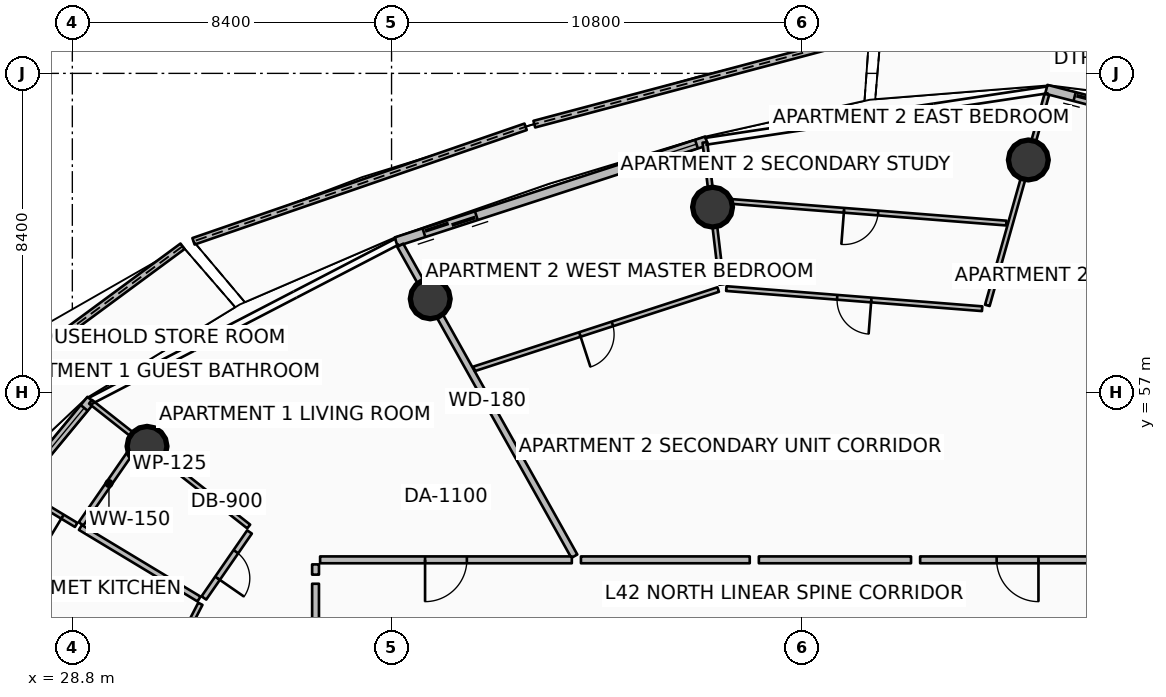
"""IFC4 building model, lengths in metres.
Left out: names, types, materials, properties, quantities, classifications, styles, units other than length and angle.
Written with IfcOpenShell. Run it as: python <this file> out.ifc"""

import sys

from ifc_helpers import new_model, si_unit, direction, frame, frame_2d, origin, origin_2d, place, context, subcontext, project, spatial, polyline, rectangle, circle, outline, extrude, element, fill, save


model = new_model("IFC4")
c1 = context("Model", 3, precision=1e-05, world=origin(), true_north=direction((0.0, 1.0)))
c2 = subcontext(c1, "Body", "Model", "MODEL_VIEW")
j1 = project(units=[si_unit("LENGTHUNIT", "METRE"), si_unit("PLANEANGLEUNIT", "RADIAN")], contexts=[c1])
p1 = place(None, origin())
s1 = spatial("IfcSite", under=j1, at=p1, CompositionType="ELEMENT")
p2 = place(p1, origin())
s2 = spatial("IfcBuilding", under=s1, at=p2, CompositionType="ELEMENT")
p3 = place(p2, frame((0.0, 0.0, 169.05)))
s3 = spatial("IfcBuildingStorey", under=s2, at=p3, CompositionType="ELEMENT", Elevation=169.05)
for number, where, z_axis, x_axis in (
    (1, (53.957, 63.122, 0.0), (0.0, 0.0, 1.0), (1.0, 0.0, 0.0)),
    (2, (45.647, 61.881, 0.0), (0.0, 0.0, 1.0), (1.0, 0.0, 0.0)),
    (3, (38.218, 59.467, 0.0), (0.0, 0.0, 1.0), (1.0, 0.0, 0.0)),
    (4, (30.766, 55.586, 0.0), (0.0, 0.0, 1.0), (1.0, 0.0, 0.0)),
):
    element("IfcColumn", number, at=place(p3, frame(where, z_axis=z_axis, x_axis=x_axis)), inside=s3, PredefinedType="COLUMN", context=c2, shape_type="SweptSolid", body=[
        extrude(circle(Radius=0.525, at=origin_2d()), origin(), (0.0, 0.0, 1.0), 3.5),
    ])
p4 = place(p3, frame((49.771, 66.404, 0.0), z_axis=(0.0, 0.0, 1.0), x_axis=(-0.966520511407, -0.256589362658, 0.0)))
e5 = element("IfcWall", 5, at=p4, inside=s3, PredefinedType="PARAPET", context=c2, shape_type="SweptSolid", body=[
    extrude(outline(polyline([(0.0, 0.0), (9.119, 0.0), (9.119, 1.148), (4.56, 1.127), (0.0, 1.224), (0.0, 0.0)])), frame((0.0, 0.09, 0.0), z_axis=(0.0, -1.0, 0.0), x_axis=(1.0, 0.0, 0.0)), (0.0, 0.0, 1.0), 0.18),
])
p5 = place(p3, frame((40.728, 63.994, 0.0), z_axis=(0.0, 0.0, 1.0), x_axis=(-0.945395712623, -0.325924755971, 0.0)))
e6 = element("IfcWall", 6, at=p5, inside=s3, PredefinedType="PARAPET", context=c2, shape_type="SweptSolid", body=[
    extrude(outline(polyline([(0.0, 0.0), (9.244, 0.0), (9.244, 1.483), (4.622, 1.284), (0.0, 1.148), (0.0, 0.0)])), frame((0.0, 0.09, 0.0), z_axis=(0.0, -1.0, 0.0), x_axis=(1.0, 0.0, 0.0)), (0.0, 0.0, 1.0), 0.18),
])
p6 = place(p3, frame((31.7, 60.85, 0.0), z_axis=(0.0, 0.0, 1.0), x_axis=(-0.804716582715, -0.593659179584, 0.0)))
e7 = element("IfcWall", 7, at=p6, inside=s3, PredefinedType="PARAPET", context=c2, shape_type="SweptSolid", body=[
    extrude(outline(polyline([(0.0, 0.0), (10.386, 0.0), (10.386, 1.832), (5.193, 1.696), (0.0, 1.497), (0.0, 0.0)])), frame((0.0, 0.09, 0.0), z_axis=(0.0, -1.0, 0.0), x_axis=(1.0, 0.0, 0.0)), (0.0, 0.0, 1.0), 0.18),
])
p7 = place(p3, frame((64.192, 62.466, 0.0), z_axis=(0.0, 0.0, 1.0), x_axis=(-0.968379685126, 0.249481032214, 0.0)))
e8 = element("IfcWall", 8, at=p7, inside=s3, PredefinedType="SOLIDWALL", context=c2, shape_type="SweptSolid", body=[
    extrude(rectangle(XDim=10.082, YDim=0.24, at=frame_2d((5.041, 0.0))), origin(), (0.0, 0.0, 1.0), 2.45),
])
p8 = place(p7, frame((7.862, 0.0, 0.0)))
e9 = element("IfcOpeningElement", 9, at=p8, cuts=e8, PredefinedType="OPENING", context=c2, shape_type="SweptSolid", body=[
    extrude(rectangle(XDim=1.45, YDim=2.15, at=frame_2d((0.725, 1.075))), frame((0.0, 0.13, 0.0), z_axis=(0.0, -1.0, 0.0), x_axis=(1.0, 0.0, 0.0)), (0.0, 0.0, 1.0), 0.26),
])
p9 = place(p7, frame((0.28, 0.0, 0.65)))
e10 = element("IfcOpeningElement", 10, at=p9, cuts=e8, PredefinedType="OPENING", context=c2, shape_type="SweptSolid", body=[
    extrude(rectangle(XDim=1.6, YDim=1.5, at=frame_2d((0.8, 0.75))), frame((0.0, 0.13, 0.0), z_axis=(0.0, -1.0, 0.0), x_axis=(1.0, 0.0, 0.0)), (0.0, 0.0, 1.0), 0.26),
])
p10 = place(p3, frame((45.49, 63.624, 0.0), z_axis=(0.0, 0.0, 1.0), x_axis=(-0.951046390632, -0.309048156224, 0.0)))
e11 = element("IfcWall", 11, at=p10, inside=s3, PredefinedType="SOLIDWALL", context=c2, shape_type="SweptSolid", body=[
    extrude(rectangle(XDim=8.59, YDim=0.24, at=frame_2d((4.295, 0.0))), origin(), (0.0, 0.0, 1.0), 2.45),
])
p11 = place(p10, frame((6.37, 0.0, 0.0)))
e12 = element("IfcOpeningElement", 12, at=p11, cuts=e11, PredefinedType="OPENING", context=c2, shape_type="SweptSolid", body=[
    extrude(rectangle(XDim=1.45, YDim=2.15, at=frame_2d((0.725, 1.075))), frame((0.0, 0.13, 0.0), z_axis=(0.0, -1.0, 0.0), x_axis=(1.0, 0.0, 0.0)), (0.0, 0.0, 1.0), 0.26),
])
p12 = place(p10, frame((0.28, 0.0, 0.65)))
e13 = element("IfcOpeningElement", 13, at=p12, cuts=e11, PredefinedType="OPENING", context=c2, shape_type="SweptSolid", body=[
    extrude(rectangle(XDim=1.6, YDim=1.5, at=frame_2d((0.8, 0.75))), frame((0.0, 0.13, 0.0), z_axis=(0.0, -1.0, 0.0), x_axis=(1.0, 0.0, 0.0)), (0.0, 0.0, 1.0), 0.26),
])
p13 = place(p3, frame((29.291, 56.813, 0.0), z_axis=(0.0, 0.0, 1.0), x_axis=(-0.636771922292, -0.77105221547, 0.0)))
e14 = element("IfcWall", 14, at=p13, inside=s3, PredefinedType="SOLIDWALL", context=c2, shape_type="SweptSolid", body=[
    extrude(rectangle(XDim=10.082, YDim=0.24, at=frame_2d((5.041, 0.0))), origin(), (0.0, 0.0, 1.0), 2.45),
])
p14 = place(p13, frame((7.862, 0.0, 0.0)))
e15 = element("IfcOpeningElement", 15, at=p14, cuts=e14, PredefinedType="OPENING", context=c2, shape_type="SweptSolid", body=[
    extrude(rectangle(XDim=1.45, YDim=2.15, at=frame_2d((0.725, 1.075))), frame((0.0, 0.13, 0.0), z_axis=(0.0, -1.0, 0.0), x_axis=(1.0, 0.0, 0.0)), (0.0, 0.0, 1.0), 0.26),
])
p15 = place(p13, frame((0.28, 0.0, 0.65)))
e16 = element("IfcOpeningElement", 16, at=p15, cuts=e14, PredefinedType="OPENING", context=c2, shape_type="SweptSolid", body=[
    extrude(rectangle(XDim=1.6, YDim=1.5, at=frame_2d((0.8, 0.75))), frame((0.0, 0.13, 0.0), z_axis=(0.0, -1.0, 0.0), x_axis=(1.0, 0.0, 0.0)), (0.0, 0.0, 1.0), 0.26),
])
p16 = place(p3, frame((42.01, 52.696, 0.0), z_axis=(0.0, 0.0, 1.0), x_axis=(-0.488627157427, 0.872492693967, 0.0)))
e17 = element("IfcWall", 17, at=p16, inside=s3, PredefinedType="PARTITIONING", context=c2, shape_type="SweptSolid", body=[
    extrude(rectangle(XDim=9.375, YDim=0.18, at=frame_2d((4.688, 0.0))), origin(), (0.0, 0.0, 1.0), 2.94),
])
p17 = place(p3, frame((41.944, 52.6, 0.0), z_axis=(0.0, 0.0, 1.0), x_axis=(-1.0, 0.0, 0.0)))
e18 = element("IfcWall", 18, at=p17, inside=s3, PredefinedType="PARTITIONING", context=c2, shape_type="SweptSolid", body=[
    extrude(rectangle(XDim=6.624, YDim=0.18, at=frame_2d((3.312, 0.0))), origin(), (0.0, 0.0, 1.0), 2.94),
])
p18 = place(p17, frame((2.762, 0.0, 0.0)))
e19 = element("IfcOpeningElement", 19, at=p18, cuts=e18, PredefinedType="OPENING", context=c2, shape_type="SweptSolid", body=[
    extrude(rectangle(XDim=1.1, YDim=2.1, at=frame_2d((0.55, 1.05))), frame((0.0, 0.1, 0.0), z_axis=(0.0, -1.0, 0.0), x_axis=(1.0, 0.0, 0.0)), (0.0, 0.0, 1.0), 0.2),
])
p19 = place(p3, frame((35.2, 52.48, 0.0), z_axis=(0.0, 0.0, 1.0), x_axis=(0.0, -1.0, 0.0)))
e20 = element("IfcWall", 20, at=p19, inside=s3, PredefinedType="PARTITIONING", context=c2, shape_type="SweptSolid", body=[
    extrude(rectangle(XDim=0.269, YDim=0.18, at=frame_2d((0.135, 0.0))), origin(), (0.0, 0.0, 1.0), 2.94),
])
p20 = place(p3, frame((35.2, 51.971, 0.0), z_axis=(0.0, 0.0, 1.0), x_axis=(0.0, -1.0, 0.0)))
e21 = element("IfcWall", 21, at=p20, inside=s3, PredefinedType="PARTITIONING", context=c2, shape_type="SweptSolid", body=[
    extrude(rectangle(XDim=6.241, YDim=0.18, at=frame_2d((3.12, 0.0))), origin(), (0.0, 0.0, 1.0), 2.94),
])
p21 = place(p3, frame((33.441, 53.477, 0.0), z_axis=(0.0, 0.0, 1.0), x_axis=(-0.785319981095, 0.619090080112, 0.0)))
e22 = element("IfcWall", 22, at=p21, inside=s3, PredefinedType="PARTITIONING", context=c2, shape_type="SweptSolid", body=[
    extrude(rectangle(XDim=5.301, YDim=0.125, at=frame_2d((2.65, 0.0))), origin(), (0.0, 0.0, 1.0), 2.94),
])
p22 = place(p3, frame((33.463, 53.333, 0.0), z_axis=(0.0, 0.0, 1.0), x_axis=(-0.568843105688, -0.822446059697, 0.0)))
e23 = element("IfcWall", 23, at=p22, inside=s3, PredefinedType="PARTITIONING", context=c2, shape_type="SweptSolid", body=[
    extrude(rectangle(XDim=2.111, YDim=0.15, at=frame_2d((1.056, 0.0))), origin(), (0.0, 0.0, 1.0), 2.94),
])
p23 = place(p22, frame((0.631, 0.0, 0.0)))
e24 = element("IfcOpeningElement", 24, at=p23, cuts=e23, PredefinedType="OPENING", context=c2, shape_type="SweptSolid", body=[
    extrude(rectangle(XDim=0.85, YDim=2.06, at=frame_2d((0.425, 1.03))), frame((0.0, 0.085, 0.0), z_axis=(0.0, -1.0, 0.0), x_axis=(1.0, 0.0, 0.0)), (0.0, 0.0, 1.0), 0.17),
])
p24 = place(p3, frame((30.498, 55.67, 0.0), z_axis=(0.0, 0.0, 1.0), x_axis=(-0.56886579211, -0.822430368218, 0.0)))
e25 = element("IfcWall", 25, at=p24, inside=s3, PredefinedType="PARTITIONING", context=c2, shape_type="SweptSolid", body=[
    extrude(rectangle(XDim=2.582, YDim=0.15, at=frame_2d((1.291, 0.0))), origin(), (0.0, 0.0, 1.0), 2.94),
])
p25 = place(p3, frame((32.133, 51.57, 0.0), z_axis=(0.0, 0.0, 1.0), x_axis=(-0.856320461768, 0.516444834186, 0.0)))
e26 = element("IfcWall", 26, at=p25, inside=s3, PredefinedType="PARTITIONING", context=c2, shape_type="SweptSolid", body=[
    extrude(rectangle(XDim=3.645, YDim=0.15, at=frame_2d((1.822, 0.0))), origin(), (0.0, 0.0, 1.0), 2.94),
])
p26 = place(p3, frame((28.901, 53.519, 0.0), z_axis=(0.0, 0.0, 1.0), x_axis=(-0.856306503803, 0.516467977269, 0.0)))
e27 = element("IfcWall", 27, at=p26, inside=s3, PredefinedType="PARTITIONING", context=c2, shape_type="SweptSolid", body=[
    extrude(rectangle(XDim=1.692, YDim=0.125, at=frame_2d((0.846, 0.0))), origin(), (0.0, 0.0, 1.0), 2.94),
])
p27 = place(p26, frame((0.421, 0.0, 0.0)))
e28 = element("IfcOpeningElement", 28, at=p27, cuts=e27, PredefinedType="OPENING", context=c2, shape_type="SweptSolid", body=[
    extrude(rectangle(XDim=0.85, YDim=2.06, at=frame_2d((0.425, 1.03))), frame((0.0, 0.073, 0.0), z_axis=(0.0, -1.0, 0.0), x_axis=(1.0, 0.0, 0.0)), (0.0, 0.0, 1.0), 0.145),
])
p28 = place(p3, frame((30.998, 49.365, 0.0), z_axis=(0.0, 0.0, 1.0), x_axis=(-0.917591640713, 0.397524314845, 0.0)))
e29 = element("IfcWall", 29, at=p28, inside=s3, PredefinedType="PARTITIONING", context=c2, shape_type="SweptSolid", body=[
    extrude(rectangle(XDim=6.182, YDim=0.125, at=frame_2d((3.091, 0.0))), origin(), (0.0, 0.0, 1.0), 2.94),
])
p29 = place(p3, frame((32.169, 51.443, 0.0), z_axis=(0.0, 0.0, 1.0), x_axis=(-0.458020211203, -0.888941778819, 0.0)))
e30 = element("IfcWall", 30, at=p29, inside=s3, PredefinedType="PARTITIONING", context=c2, shape_type="SweptSolid", body=[
    extrude(rectangle(XDim=2.297, YDim=0.125, at=frame_2d((1.149, 0.0))), origin(), (0.0, 0.0, 1.0), 2.94),
])
p30 = place(p29, frame((0.724, 0.0, 0.0)))
e31 = element("IfcOpeningElement", 31, at=p30, cuts=e30, PredefinedType="OPENING", context=c2, shape_type="SweptSolid", body=[
    extrude(rectangle(XDim=0.85, YDim=2.06, at=frame_2d((0.425, 1.03))), frame((0.0, 0.073, 0.0), z_axis=(0.0, -1.0, 0.0), x_axis=(1.0, 0.0, 0.0)), (0.0, 0.0, 1.0), 0.145),
])
p31 = place(p3, frame((56.236, 52.6, 0.0), z_axis=(0.0, 0.0, 1.0), x_axis=(-1.0, 0.0, 0.0)))
e32 = element("IfcWall", 32, at=p31, inside=s3, PredefinedType="PARTITIONING", context=c2, shape_type="SweptSolid", body=[
    extrude(rectangle(XDim=5.127, YDim=0.18, at=frame_2d((2.563, 0.0))), origin(), (0.0, 0.0, 1.0), 2.94),
])
p32 = place(p31, frame((2.013, 0.0, 0.0)))
e33 = element("IfcOpeningElement", 33, at=p32, cuts=e32, PredefinedType="OPENING", context=c2, shape_type="SweptSolid", body=[
    extrude(rectangle(XDim=1.1, YDim=2.1, at=frame_2d((0.55, 1.05))), frame((0.0, 0.1, 0.0), z_axis=(0.0, -1.0, 0.0), x_axis=(1.0, 0.0, 0.0)), (0.0, 0.0, 1.0), 0.2),
])
p33 = place(p3, frame((50.869, 52.6, 0.0), z_axis=(0.0, 0.0, 1.0), x_axis=(-1.0, 0.0, 0.0)))
e34 = element("IfcWall", 34, at=p33, inside=s3, PredefinedType="PARTITIONING", context=c2, shape_type="SweptSolid", body=[
    extrude(rectangle(XDim=4.004, YDim=0.18, at=frame_2d((2.002, 0.0))), origin(), (0.0, 0.0, 1.0), 2.94),
])
p34 = place(p3, frame((52.878, 59.295, 0.0), z_axis=(0.0, 0.0, 1.0), x_axis=(0.271461170106, 0.962449392501, 0.0)))
e35 = element("IfcWall", 35, at=p34, inside=s3, PredefinedType="PARTITIONING", context=c2, shape_type="SweptSolid", body=[
    extrude(rectangle(XDim=5.769, YDim=0.125, at=frame_2d((2.885, 0.0))), origin(), (0.0, 0.0, 1.0), 2.94),
])
p35 = place(p3, frame((52.741, 59.208, 0.0), z_axis=(0.0, 0.0, 1.0), x_axis=(-0.996917452966, 0.078457580711, 0.0)))
e36 = element("IfcWall", 36, at=p35, inside=s3, PredefinedType="PARTITIONING", context=c2, shape_type="SweptSolid", body=[
    extrude(rectangle(XDim=6.752, YDim=0.125, at=frame_2d((3.376, 0.0))), origin(), (0.0, 0.0, 1.0), 2.94),
])
p36 = place(p35, frame((2.926, 0.0, 0.0)))
e37 = element("IfcOpeningElement", 37, at=p36, cuts=e36, PredefinedType="OPENING", context=c2, shape_type="SweptSolid", body=[
    extrude(rectangle(XDim=0.9, YDim=2.08, at=frame_2d((0.45, 1.04))), frame((0.0, 0.073, 0.0), z_axis=(0.0, -1.0, 0.0), x_axis=(1.0, 0.0, 0.0)), (0.0, 0.0, 1.0), 0.145),
])
p37 = place(p3, frame((53.376, 61.461, 0.0), z_axis=(0.0, 0.0, 1.0), x_axis=(-0.996916336075, 0.078471771143, 0.0)))
e38 = element("IfcWall", 38, at=p37, inside=s3, PredefinedType="PARTITIONING", context=c2, shape_type="SweptSolid", body=[
    extrude(rectangle(XDim=7.666, YDim=0.125, at=frame_2d((3.833, 0.0))), origin(), (0.0, 0.0, 1.0), 2.94),
])
p38 = place(p37, frame((3.383, 0.0, 0.0)))
e39 = element("IfcOpeningElement", 39, at=p38, cuts=e38, PredefinedType="OPENING", context=c2, shape_type="SweptSolid", body=[
    extrude(rectangle(XDim=0.9, YDim=2.08, at=frame_2d((0.45, 1.04))), frame((0.0, 0.073, 0.0), z_axis=(0.0, -1.0, 0.0), x_axis=(1.0, 0.0, 0.0)), (0.0, 0.0, 1.0), 0.145),
])
p39 = place(p3, frame((46.625, 52.6, 0.0), z_axis=(0.0, 0.0, 1.0), x_axis=(-1.0, 0.0, 0.0)))
e40 = element("IfcWall", 40, at=p39, inside=s3, PredefinedType="PARTITIONING", context=c2, shape_type="SweptSolid", body=[
    extrude(rectangle(XDim=4.442, YDim=0.18, at=frame_2d((2.221, 0.0))), origin(), (0.0, 0.0, 1.0), 2.94),
])
p40 = place(p3, frame((45.888, 59.845, 0.0), z_axis=(0.0, 0.0, 1.0), x_axis=(-0.117510984651, 0.99307158276, 0.0)))
e41 = element("IfcWall", 41, at=p40, inside=s3, PredefinedType="PARTITIONING", context=c2, shape_type="SweptSolid", body=[
    extrude(rectangle(XDim=3.765, YDim=0.125, at=frame_2d((1.882, 0.0))), origin(), (0.0, 0.0, 1.0), 2.94),
])
p41 = place(p3, frame((45.795, 59.712, 0.0), z_axis=(0.0, 0.0, 1.0), x_axis=(-0.951056650279, -0.309016582016, 0.0)))
e42 = element("IfcWall", 42, at=p41, inside=s3, PredefinedType="PARTITIONING", context=c2, shape_type="SweptSolid", body=[
    extrude(rectangle(XDim=6.753, YDim=0.125, at=frame_2d((3.376, 0.0))), origin(), (0.0, 0.0, 1.0), 2.94),
])
p42 = place(p41, frame((2.926, 0.0, 0.0)))
e43 = element("IfcOpeningElement", 43, at=p42, cuts=e42, PredefinedType="OPENING", context=c2, shape_type="SweptSolid", body=[
    extrude(rectangle(XDim=0.9, YDim=2.08, at=frame_2d((0.45, 1.04))), frame((0.0, 0.073, 0.0), z_axis=(0.0, -1.0, 0.0), x_axis=(1.0, 0.0, 0.0)), (0.0, 0.0, 1.0), 0.145),
])
p43 = place(p8, origin())
e44 = element("IfcDoor", 44, at=p43, inside=s3, OperationType="DOUBLE_DOOR_SLIDING", PredefinedType="DOOR", context=c2, shape_type="SweptSolid", body=[
    extrude(rectangle(XDim=1.45, YDim=2.15, at=frame_2d((0.725, 1.075))), frame((0.0, 0.025, 0.0), z_axis=(0.0, -1.0, 0.0), x_axis=(1.0, 0.0, 0.0)), (0.0, 0.0, 1.0), 0.05),
])
fill(e9, e44)
p44 = place(p11, origin())
e45 = element("IfcDoor", 45, at=p44, inside=s3, OperationType="DOUBLE_DOOR_SLIDING", PredefinedType="DOOR", context=c2, shape_type="SweptSolid", body=[
    extrude(rectangle(XDim=1.45, YDim=2.15, at=frame_2d((0.725, 1.075))), frame((0.0, 0.025, 0.0), z_axis=(0.0, -1.0, 0.0), x_axis=(1.0, 0.0, 0.0)), (0.0, 0.0, 1.0), 0.05),
])
fill(e12, e45)
p45 = place(p12, origin())
e46 = element("IfcWindow", 46, at=p45, inside=s3, PartitioningType="SINGLE_PANEL", PredefinedType="WINDOW", context=c2, shape_type="SweptSolid", body=[
    extrude(rectangle(XDim=1.6, YDim=1.5, at=frame_2d((0.8, 0.75))), frame((0.0, 0.03, 0.0), z_axis=(0.0, -1.0, 0.0), x_axis=(1.0, 0.0, 0.0)), (0.0, 0.0, 1.0), 0.06),
])
fill(e13, e46)
p46 = place(p15, origin())
e47 = element("IfcWindow", 47, at=p46, inside=s3, PartitioningType="SINGLE_PANEL", PredefinedType="WINDOW", context=c2, shape_type="SweptSolid", body=[
    extrude(rectangle(XDim=1.6, YDim=1.5, at=frame_2d((0.8, 0.75))), frame((0.0, 0.03, 0.0), z_axis=(0.0, -1.0, 0.0), x_axis=(1.0, 0.0, 0.0)), (0.0, 0.0, 1.0), 0.06),
])
fill(e16, e47)
p47 = place(p18, origin())
e48 = element("IfcDoor", 48, at=p47, inside=s3, OperationType="SINGLE_SWING_RIGHT", PredefinedType="DOOR", context=c2, shape_type="SweptSolid", body=[
    extrude(rectangle(XDim=1.1, YDim=2.1, at=frame_2d((0.55, 1.05))), frame((0.0, 0.025, 0.0), z_axis=(0.0, -1.0, 0.0), x_axis=(1.0, 0.0, 0.0)), (0.0, 0.0, 1.0), 0.05),
])
fill(e19, e48)
p48 = place(p23, origin())
e49 = element("IfcDoor", 49, at=p48, inside=s3, OperationType="SINGLE_SWING_RIGHT", PredefinedType="DOOR", context=c2, shape_type="SweptSolid", body=[
    extrude(rectangle(XDim=0.85, YDim=2.06, at=frame_2d((0.425, 1.03))), frame((0.0, 0.025, 0.0), z_axis=(0.0, -1.0, 0.0), x_axis=(1.0, 0.0, 0.0)), (0.0, 0.0, 1.0), 0.05),
])
fill(e24, e49)
p49 = place(p27, origin())
e50 = element("IfcDoor", 50, at=p49, inside=s3, OperationType="SINGLE_SWING_LEFT", PredefinedType="DOOR", context=c2, shape_type="SweptSolid", body=[
    extrude(rectangle(XDim=0.85, YDim=2.06, at=frame_2d((0.425, 1.03))), frame((0.0, 0.025, 0.0), z_axis=(0.0, -1.0, 0.0), x_axis=(1.0, 0.0, 0.0)), (0.0, 0.0, 1.0), 0.05),
])
fill(e28, e50)
p50 = place(p32, origin())
e51 = element("IfcDoor", 51, at=p50, inside=s3, OperationType="SINGLE_SWING_LEFT", PredefinedType="DOOR", context=c2, shape_type="SweptSolid", body=[
    extrude(rectangle(XDim=1.1, YDim=2.1, at=frame_2d((0.55, 1.05))), frame((0.0, 0.025, 0.0), z_axis=(0.0, -1.0, 0.0), x_axis=(1.0, 0.0, 0.0)), (0.0, 0.0, 1.0), 0.05),
])
fill(e33, e51)
p51 = place(p36, origin())
e52 = element("IfcDoor", 52, at=p51, inside=s3, OperationType="SINGLE_SWING_LEFT", PredefinedType="DOOR", context=c2, shape_type="SweptSolid", body=[
    extrude(rectangle(XDim=0.9, YDim=2.08, at=frame_2d((0.45, 1.04))), frame((0.0, 0.025, 0.0), z_axis=(0.0, -1.0, 0.0), x_axis=(1.0, 0.0, 0.0)), (0.0, 0.0, 1.0), 0.05),
])
fill(e37, e52)
p52 = place(p38, origin())
e53 = element("IfcDoor", 53, at=p52, inside=s3, OperationType="SINGLE_SWING_RIGHT", PredefinedType="DOOR", context=c2, shape_type="SweptSolid", body=[
    extrude(rectangle(XDim=0.9, YDim=2.08, at=frame_2d((0.45, 1.04))), frame((0.0, 0.025, 0.0), z_axis=(0.0, -1.0, 0.0), x_axis=(1.0, 0.0, 0.0)), (0.0, 0.0, 1.0), 0.05),
])
fill(e39, e53)
p53 = place(p42, origin())
e54 = element("IfcDoor", 54, at=p53, inside=s3, OperationType="SINGLE_SWING_RIGHT", PredefinedType="DOOR", context=c2, shape_type="SweptSolid", body=[
    extrude(rectangle(XDim=0.9, YDim=2.08, at=frame_2d((0.45, 1.04))), frame((0.0, 0.025, 0.0), z_axis=(0.0, -1.0, 0.0), x_axis=(1.0, 0.0, 0.0)), (0.0, 0.0, 1.0), 0.05),
])
fill(e43, e54)
save(model, sys.argv[1])
